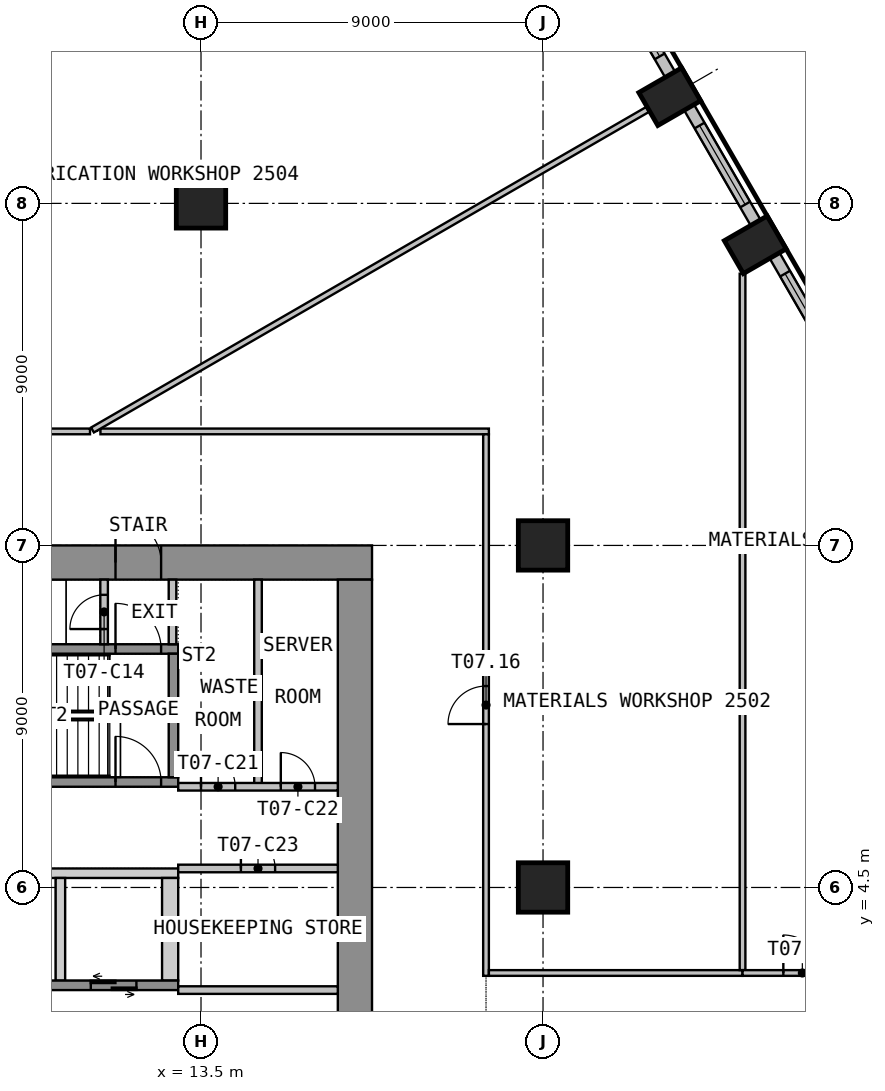
"""IFC4 building model, lengths in metres.
Left out: names, types, materials, properties, quantities, classifications, styles, units other than length and angle.
Written with IfcOpenShell. Run it as: python <this file> out.ifc"""

import sys

from ifc_helpers import new_model, si_unit, direction, frame, frame_2d, origin, origin_2d, place, context, subcontext, project, spatial, polyline, rectangle, circle, outline, extrude, element, fill, save


model = new_model("IFC4")
c1 = context("Model", 3, precision=1e-05, world=origin(), true_north=direction((0.0, 1.0)))
c2 = subcontext(c1, "Body", "Model", "MODEL_VIEW")
j1 = project(units=[si_unit("LENGTHUNIT", "METRE"), si_unit("PLANEANGLEUNIT", "RADIAN")], contexts=[c1])
p1 = place(None, origin())
s1 = spatial("IfcSite", under=j1, at=p1, CompositionType="ELEMENT")
p2 = place(p1, origin())
s2 = spatial("IfcBuilding", under=s1, at=p2, CompositionType="ELEMENT")
p3 = place(p2, frame((0.0, 0.0, 104.7)))
s3 = spatial("IfcBuildingStorey", under=s2, at=p3, CompositionType="ELEMENT", Elevation=104.7)
for number, where, z_axis, x_axis in (
    (1, (28.084, 21.411, 0.0), (0.0, 0.0, 1.0), (-0.5, 0.866, 0.0)),
    (2, (25.834, 25.308, 0.0), (0.0, 0.0, 1.0), (-0.5, 0.866, 0.0)),
):
    element("IfcColumn", number, at=place(p3, frame(where, z_axis=z_axis, x_axis=x_axis)), inside=s3, PredefinedType="COLUMN", context=c2, shape_type="SweptSolid", body=[
        extrude(rectangle(XDim=1.0, YDim=1.3, at=origin_2d()), origin(), (0.0, 0.0, 1.0), 3.525),
    ])
for number, where, z_axis, x_axis in (
    (3, (13.5, 22.5, 0.0), (0.0, 0.0, 1.0), (1.0, 0.0, 0.0)),
    (4, (22.5, 4.5, 0.0), (0.0, 0.0, 1.0), (1.0, 0.0, 0.0)),
    (5, (22.5, 13.5, 0.0), (0.0, 0.0, 1.0), (1.0, 0.0, 0.0)),
):
    element("IfcColumn", number, at=place(p3, frame(where, z_axis=z_axis, x_axis=x_axis)), inside=s3, PredefinedType="COLUMN", context=c2, shape_type="SweptSolid", body=[
        extrude(circle(Radius=0.65, at=origin_2d()), origin(), (0.0, 0.0, 1.0), 3.525),
    ])
p4 = place(p3, frame((30.344, 18.097, 0.0), z_axis=(0.0, 0.0, 1.0), x_axis=(-0.499996256241, 0.866027565234, 0.0)))
e6 = element("IfcWall", 6, at=p4, inside=s3, PredefinedType="SOLIDWALL", context=c2, shape_type="SweptSolid", body=[
    extrude(rectangle(XDim=3.499, YDim=0.3, at=frame_2d((1.75, 0.0))), origin(), (0.0, 0.0, 1.0), 3.525),
])
p5 = place(p4, frame((0.55, 0.0, 0.9)))
e7 = element("IfcOpeningElement", 7, at=p5, cuts=e6, PredefinedType="OPENING", context=c2, shape_type="SweptSolid", body=[
    extrude(rectangle(XDim=2.4, YDim=2.1, at=frame_2d((1.2, 1.05))), frame((0.0, 0.16, 0.0), z_axis=(0.0, -1.0, 0.0), x_axis=(1.0, 0.0, 0.0)), (0.0, 0.0, 1.0), 0.32),
])
p6 = place(p3, frame((28.094, 21.994, 0.0), z_axis=(0.0, 0.0, 1.0), x_axis=(-0.499996256241, 0.866027565234, 0.0)))
e8 = element("IfcWall", 8, at=p6, inside=s3, PredefinedType="SOLIDWALL", context=c2, shape_type="SweptSolid", body=[
    extrude(rectangle(XDim=3.499, YDim=0.3, at=frame_2d((1.75, 0.0))), origin(), (0.0, 0.0, 1.0), 3.525),
])
p7 = place(p6, frame((0.55, 0.0, 0.9)))
e9 = element("IfcOpeningElement", 9, at=p7, cuts=e8, PredefinedType="OPENING", context=c2, shape_type="SweptSolid", body=[
    extrude(rectangle(XDim=2.4, YDim=2.1, at=frame_2d((1.2, 1.05))), frame((0.0, 0.16, 0.0), z_axis=(0.0, -1.0, 0.0), x_axis=(1.0, 0.0, 0.0)), (0.0, 0.0, 1.0), 0.32),
])
p8 = place(p3, frame((25.844, 25.891, 0.0), z_axis=(0.0, 0.0, 1.0), x_axis=(-0.500004907028, 0.866022570692, 0.0)))
e10 = element("IfcWall", 10, at=p8, inside=s3, PredefinedType="SOLIDWALL", context=c2, shape_type="SweptSolid", body=[
    extrude(rectangle(XDim=3.192, YDim=0.3, at=frame_2d((1.596, 0.0))), origin(), (0.0, 0.0, 1.0), 3.525),
])
p9 = place(p8, frame((0.55, 0.0, 0.9)))
e11 = element("IfcOpeningElement", 11, at=p9, cuts=e10, PredefinedType="OPENING", context=c2, shape_type="SweptSolid", body=[
    extrude(rectangle(XDim=2.4, YDim=2.1, at=frame_2d((1.2, 1.05))), frame((0.0, 0.16, 0.0), z_axis=(0.0, -1.0, 0.0), x_axis=(1.0, 0.0, 0.0)), (0.0, 0.0, 1.0), 0.32),
])
p10 = place(p3, frame((-18.0, 13.05, 0.0), z_axis=(0.0, 0.0, 1.0), x_axis=(1.0, 0.0, 0.0)))
e12 = element("IfcWall", 12, at=p10, inside=s3, PredefinedType="SHEAR", context=c2, shape_type="SweptSolid", body=[
    extrude(rectangle(XDim=36.0, YDim=0.9, at=frame_2d((18.0, 0.0))), origin(), (0.0, 0.0, 1.0), 3.525),
])
p11 = place(p10, frame((16.8, 0.0, 0.0)))
e13 = element("IfcOpeningElement", 13, at=p11, cuts=e12, PredefinedType="OPENING", context=c2, shape_type="SweptSolid", body=[
    extrude(rectangle(XDim=2.4, YDim=2.1, at=frame_2d((1.2, 1.05))), frame((0.0, 0.46, 0.0), z_axis=(0.0, -1.0, 0.0), x_axis=(1.0, 0.0, 0.0)), (0.0, 0.0, 1.0), 0.92),
])
p12 = place(p10, frame((5.55, 0.0, 0.0)))
e14 = element("IfcOpeningElement", 14, at=p12, cuts=e12, PredefinedType="OPENING", context=c2, shape_type="SweptSolid", body=[
    extrude(rectangle(XDim=1.2, YDim=2.1, at=frame_2d((0.6, 1.05))), frame((0.0, 0.46, 0.0), z_axis=(0.0, -1.0, 0.0), x_axis=(1.0, 0.0, 0.0)), (0.0, 0.0, 1.0), 0.92),
])
p13 = place(p10, frame((29.25, 0.0, 0.0)))
e15 = element("IfcOpeningElement", 15, at=p13, cuts=e12, PredefinedType="OPENING", context=c2, shape_type="SweptSolid", body=[
    extrude(rectangle(XDim=1.2, YDim=2.1, at=frame_2d((0.6, 1.05))), frame((0.0, 0.46, 0.0), z_axis=(0.0, -1.0, 0.0), x_axis=(1.0, 0.0, 0.0)), (0.0, 0.0, 1.0), 0.92),
])
p14 = place(p3, frame((17.55, -12.6, 0.0), z_axis=(0.0, 0.0, 1.0), x_axis=(0.0, 1.0, 0.0)))
e16 = element("IfcWall", 16, at=p14, inside=s3, PredefinedType="SHEAR", context=c2, shape_type="SweptSolid", body=[
    extrude(rectangle(XDim=25.2, YDim=0.9, at=frame_2d((12.6, 0.0))), origin(), (0.0, 0.0, 1.0), 3.525),
])
p15 = place(p14, frame((11.4, 0.0, 0.0)))
e17 = element("IfcOpeningElement", 17, at=p15, cuts=e16, PredefinedType="OPENING", context=c2, shape_type="SweptSolid", body=[
    extrude(rectangle(XDim=2.4, YDim=2.1, at=frame_2d((1.2, 1.05))), frame((0.0, 0.46, 0.0), z_axis=(0.0, -1.0, 0.0), x_axis=(1.0, 0.0, 0.0)), (0.0, 0.0, 1.0), 0.92),
])
p16 = place(p3, origin())
e18 = element("IfcWall", 18, at=p16, inside=s3, PredefinedType="SHEAR", context=c2, shape_type="SweptSolid", body=[
    extrude(outline(polyline([(-12.9, 4.75), (12.9, 4.75), (12.9, 5.0), (-12.9, 5.0), (-12.9, 4.75)])), origin(), (0.0, 0.0, 1.0), 3.525),
])
p17 = place(p3, origin())
e19 = element("IfcWall", 19, at=p17, inside=s3, PredefinedType="SHEAR", context=c2, shape_type="SweptSolid", body=[
    extrude(outline(polyline([(9.675, 2.05), (9.925, 2.05), (9.925, 4.75), (9.675, 4.75), (9.675, 2.05)])), origin(), (0.0, 0.0, 1.0), 3.525),
])
p18 = place(p3, origin())
e20 = element("IfcWall", 20, at=p18, inside=s3, PredefinedType="SHEAR", context=c2, shape_type="SweptSolid", body=[
    extrude(outline(polyline([(12.475, 2.05), (12.9, 2.05), (12.9, 4.75), (12.475, 4.75), (12.475, 2.05)])), origin(), (0.0, 0.0, 1.0), 3.525),
])
p19 = place(p3, frame((-12.9, 1.925, 0.0), z_axis=(0.0, 0.0, 1.0), x_axis=(1.0, 0.0, 0.0)))
e21 = element("IfcWall", 21, at=p19, inside=s3, PredefinedType="SHEAR", context=c2, shape_type="SweptSolid", body=[
    extrude(rectangle(XDim=25.8, YDim=0.25, at=frame_2d((12.9, 0.0))), origin(), (0.0, 0.0, 1.0), 3.525),
])
p20 = place(p19, frame((9.5, 0.0, 0.0)))
e22 = element("IfcOpeningElement", 22, at=p20, cuts=e21, PredefinedType="OPENING", context=c2, shape_type="SweptSolid", body=[
    extrude(rectangle(XDim=1.2, YDim=2.1, at=frame_2d((0.6, 1.05))), frame((0.0, 0.135, 0.0), z_axis=(0.0, -1.0, 0.0), x_axis=(1.0, 0.0, 0.0)), (0.0, 0.0, 1.0), 0.27),
])
p21 = place(p19, frame((12.3, 0.0, 0.0)))
e23 = element("IfcOpeningElement", 23, at=p21, cuts=e21, PredefinedType="OPENING", context=c2, shape_type="SweptSolid", body=[
    extrude(rectangle(XDim=1.2, YDim=2.1, at=frame_2d((0.6, 1.05))), frame((0.0, 0.135, 0.0), z_axis=(0.0, -1.0, 0.0), x_axis=(1.0, 0.0, 0.0)), (0.0, 0.0, 1.0), 0.27),
])
p22 = place(p19, frame((15.1, 0.0, 0.0)))
e24 = element("IfcOpeningElement", 24, at=p22, cuts=e21, PredefinedType="OPENING", context=c2, shape_type="SweptSolid", body=[
    extrude(rectangle(XDim=1.2, YDim=2.1, at=frame_2d((0.6, 1.05))), frame((0.0, 0.135, 0.0), z_axis=(0.0, -1.0, 0.0), x_axis=(1.0, 0.0, 0.0)), (0.0, 0.0, 1.0), 0.27),
])
p23 = place(p19, frame((17.9, 0.0, 0.0)))
e25 = element("IfcOpeningElement", 25, at=p23, cuts=e21, PredefinedType="OPENING", context=c2, shape_type="SweptSolid", body=[
    extrude(rectangle(XDim=1.2, YDim=2.1, at=frame_2d((0.6, 1.05))), frame((0.0, 0.135, 0.0), z_axis=(0.0, -1.0, 0.0), x_axis=(1.0, 0.0, 0.0)), (0.0, 0.0, 1.0), 0.27),
])
p24 = place(p19, frame((20.7, 0.0, 0.0)))
e26 = element("IfcOpeningElement", 26, at=p24, cuts=e21, PredefinedType="OPENING", context=c2, shape_type="SweptSolid", body=[
    extrude(rectangle(XDim=1.2, YDim=2.1, at=frame_2d((0.6, 1.05))), frame((0.0, 0.135, 0.0), z_axis=(0.0, -1.0, 0.0), x_axis=(1.0, 0.0, 0.0)), (0.0, 0.0, 1.0), 0.27),
])
p25 = place(p19, frame((23.5, 0.0, 0.0)))
e27 = element("IfcOpeningElement", 27, at=p25, cuts=e21, PredefinedType="OPENING", context=c2, shape_type="SweptSolid", body=[
    extrude(rectangle(XDim=1.2, YDim=2.1, at=frame_2d((0.6, 1.05))), frame((0.0, 0.135, 0.0), z_axis=(0.0, -1.0, 0.0), x_axis=(1.0, 0.0, 0.0)), (0.0, 0.0, 1.0), 0.27),
])
p26 = place(p3, frame((2.8, 7.275, 0.0), z_axis=(0.0, 0.0, 1.0), x_axis=(1.0, 0.0, 0.0)))
e28 = element("IfcWall", 28, at=p26, inside=s3, PredefinedType="SHEAR", context=c2, shape_type="SweptSolid", body=[
    extrude(rectangle(XDim=10.1, YDim=0.25, at=frame_2d((5.05, 0.0))), origin(), (0.0, 0.0, 1.0), 3.525),
])
p27 = place(p26, frame((8.45, 0.0, 0.0)))
e29 = element("IfcOpeningElement", 29, at=p27, cuts=e28, PredefinedType="OPENING", context=c2, shape_type="SweptSolid", body=[
    extrude(rectangle(XDim=1.2, YDim=2.1, at=frame_2d((0.6, 1.05))), frame((0.0, 0.135, 0.0), z_axis=(0.0, -1.0, 0.0), x_axis=(1.0, 0.0, 0.0)), (0.0, 0.0, 1.0), 0.27),
])
p28 = place(p3, frame((2.8, 10.775, 0.0), z_axis=(0.0, 0.0, 1.0), x_axis=(1.0, 0.0, 0.0)))
e30 = element("IfcWall", 30, at=p28, inside=s3, PredefinedType="SHEAR", context=c2, shape_type="SweptSolid", body=[
    extrude(rectangle(XDim=10.1, YDim=0.25, at=frame_2d((5.05, 0.0))), origin(), (0.0, 0.0, 1.0), 3.525),
])
p29 = place(p28, frame((8.45, 0.0, 0.0)))
e31 = element("IfcOpeningElement", 31, at=p29, cuts=e30, PredefinedType="OPENING", context=c2, shape_type="SweptSolid", body=[
    extrude(rectangle(XDim=1.2, YDim=2.1, at=frame_2d((0.6, 1.05))), frame((0.0, 0.135, 0.0), z_axis=(0.0, -1.0, 0.0), x_axis=(1.0, 0.0, 0.0)), (0.0, 0.0, 1.0), 0.27),
])
p30 = place(p3, frame((12.775, 7.4, 0.0), z_axis=(0.0, 0.0, 1.0), x_axis=(0.0, 1.0, 0.0)))
e32 = element("IfcWall", 32, at=p30, inside=s3, PredefinedType="SHEAR", context=c2, shape_type="SweptSolid", body=[
    extrude(rectangle(XDim=3.25, YDim=0.25, at=frame_2d((1.625, 0.0))), origin(), (0.0, 0.0, 1.0), 3.525),
])
p31 = place(p3, frame((12.75, 10.9, 0.0), z_axis=(0.0, 0.0, 1.0), x_axis=(0.0, 1.0, 0.0)))
e33 = element("IfcWall", 33, at=p31, inside=s3, PredefinedType="PARTITIONING", context=c2, shape_type="SweptSolid", body=[
    extrude(rectangle(XDim=1.7, YDim=0.2, at=frame_2d((0.85, 0.0))), origin(), (0.0, 0.0, 1.0), 3.525),
])
p32 = place(p3, frame((10.95, 10.9, 0.0), z_axis=(0.0, 0.0, 1.0), x_axis=(0.0, 1.0, 0.0)))
e34 = element("IfcWall", 34, at=p32, inside=s3, PredefinedType="PARTITIONING", context=c2, shape_type="SweptSolid", body=[
    extrude(rectangle(XDim=1.7, YDim=0.2, at=frame_2d((0.85, 0.0))), origin(), (0.0, 0.0, 1.0), 3.525),
])
p33 = place(p32, frame((0.4, 0.0, 0.0)))
e35 = element("IfcOpeningElement", 35, at=p33, cuts=e34, PredefinedType="OPENING", context=c2, shape_type="SweptSolid", body=[
    extrude(rectangle(XDim=0.9, YDim=2.1, at=frame_2d((0.45, 1.05))), frame((0.0, 0.11, 0.0), z_axis=(0.0, -1.0, 0.0), x_axis=(1.0, 0.0, 0.0)), (0.0, 0.0, 1.0), 0.22),
])
p34 = place(p3, frame((15.0, 7.15, 0.0), z_axis=(0.0, 0.0, 1.0), x_axis=(0.0, 1.0, 0.0)))
e36 = element("IfcWall", 36, at=p34, inside=s3, PredefinedType="PARTITIONING", context=c2, shape_type="SweptSolid", body=[
    extrude(rectangle(XDim=5.45, YDim=0.2, at=frame_2d((2.725, 0.0))), origin(), (0.0, 0.0, 1.0), 3.525),
])
p35 = place(p3, frame((12.9, 7.15, 0.0), z_axis=(0.0, 0.0, 1.0), x_axis=(1.0, 0.0, 0.0)))
e37 = element("IfcWall", 37, at=p35, inside=s3, PredefinedType="PARTITIONING", context=c2, shape_type="SweptSolid", body=[
    extrude(rectangle(XDim=4.2, YDim=0.2, at=frame_2d((2.1, 0.0))), origin(), (0.0, 0.0, 1.0), 3.525),
])
p36 = place(p35, frame((0.6, 0.0, 0.0)))
e38 = element("IfcOpeningElement", 38, at=p36, cuts=e37, PredefinedType="OPENING", context=c2, shape_type="SweptSolid", body=[
    extrude(rectangle(XDim=0.9, YDim=2.1, at=frame_2d((0.45, 1.05))), frame((0.0, 0.11, 0.0), z_axis=(0.0, -1.0, 0.0), x_axis=(1.0, 0.0, 0.0)), (0.0, 0.0, 1.0), 0.22),
])
p37 = place(p35, frame((2.7, 0.0, 0.0)))
e39 = element("IfcOpeningElement", 39, at=p37, cuts=e37, PredefinedType="OPENING", context=c2, shape_type="SweptSolid", body=[
    extrude(rectangle(XDim=0.9, YDim=2.1, at=frame_2d((0.45, 1.05))), frame((0.0, 0.11, 0.0), z_axis=(0.0, -1.0, 0.0), x_axis=(1.0, 0.0, 0.0)), (0.0, 0.0, 1.0), 0.22),
])
p38 = place(p3, frame((12.9, 5.0, 0.0), z_axis=(0.0, 0.0, 1.0), x_axis=(1.0, 0.0, 0.0)))
e40 = element("IfcWall", 40, at=p38, inside=s3, PredefinedType="PARTITIONING", context=c2, shape_type="SweptSolid", body=[
    extrude(rectangle(XDim=4.2, YDim=0.2, at=frame_2d((2.1, 0.0))), origin(), (0.0, 0.0, 1.0), 3.525),
])
p39 = place(p38, frame((1.65, 0.0, 0.0)))
e41 = element("IfcOpeningElement", 41, at=p39, cuts=e40, PredefinedType="OPENING", context=c2, shape_type="SweptSolid", body=[
    extrude(rectangle(XDim=0.9, YDim=2.1, at=frame_2d((0.45, 1.05))), frame((0.0, 0.11, 0.0), z_axis=(0.0, -1.0, 0.0), x_axis=(1.0, 0.0, 0.0)), (0.0, 0.0, 1.0), 0.22),
])
p40 = place(p3, frame((12.9, 1.8, 0.0), z_axis=(0.0, 0.0, 1.0), x_axis=(1.0, 0.0, 0.0)))
e42 = element("IfcWall", 42, at=p40, inside=s3, PredefinedType="PARTITIONING", context=c2, shape_type="SweptSolid", body=[
    extrude(rectangle(XDim=4.2, YDim=0.2, at=frame_2d((2.1, 0.0))), origin(), (0.0, 0.0, 1.0), 3.525),
])
p41 = place(p3, frame((10.579, 16.5, 0.0), z_axis=(0.0, 0.0, 1.0), x_axis=(-1.0, 0.0, 0.0)))
e43 = element("IfcWall", 43, at=p41, inside=s3, PredefinedType="PARTITIONING", context=c2, shape_type="SweptSolid", body=[
    extrude(rectangle(XDim=3.829, YDim=0.15, at=frame_2d((1.915, 0.0))), origin(), (0.0, 0.0, 1.0), 3.525),
])
p42 = place(p3, frame((21.075, 16.5, 0.0), z_axis=(0.0, 0.0, 1.0), x_axis=(-1.0, 0.0, 0.0)))
e44 = element("IfcWall", 44, at=p42, inside=s3, PredefinedType="PARTITIONING", context=c2, shape_type="SweptSolid", body=[
    extrude(rectangle(XDim=10.221, YDim=0.15, at=frame_2d((5.11, 0.0))), origin(), (0.0, 0.0, 1.0), 3.525),
])
p43 = place(p3, frame((25.254, 24.973, 0.0), z_axis=(0.0, 0.0, 1.0), x_axis=(-0.866017851419, -0.500013080853, 0.0)))
e45 = element("IfcWall", 45, at=p43, inside=s3, PredefinedType="PARTITIONING", context=c2, shape_type="SweptSolid", body=[
    extrude(rectangle(XDim=16.87, YDim=0.15, at=frame_2d((8.435, 0.0))), origin(), (0.0, 0.0, 1.0), 3.525),
])
p44 = place(p3, frame((21.0, 2.175, 0.0), z_axis=(0.0, 0.0, 1.0), x_axis=(0.0, 1.0, 0.0)))
e46 = element("IfcWall", 46, at=p44, inside=s3, PredefinedType="PARTITIONING", context=c2, shape_type="SweptSolid", body=[
    extrude(rectangle(XDim=14.25, YDim=0.15, at=frame_2d((7.125, 0.0))), origin(), (0.0, 0.0, 1.0), 3.525),
])
p45 = place(p44, frame((6.625, 0.0, 0.0)))
e47 = element("IfcOpeningElement", 47, at=p45, cuts=e46, PredefinedType="OPENING", context=c2, shape_type="SweptSolid", body=[
    extrude(rectangle(XDim=1.0, YDim=2.1, at=frame_2d((0.5, 1.05))), frame((0.0, 0.085, 0.0), z_axis=(0.0, -1.0, 0.0), x_axis=(1.0, 0.0, 0.0)), (0.0, 0.0, 1.0), 0.17),
])
p46 = place(p3, frame((21.075, 2.25, 0.0), z_axis=(0.0, 0.0, 1.0), x_axis=(1.0, 0.0, 0.0)))
e48 = element("IfcWall", 48, at=p46, inside=s3, PredefinedType="PARTITIONING", context=c2, shape_type="SweptSolid", body=[
    extrude(rectangle(XDim=6.675, YDim=0.15, at=frame_2d((3.337, 0.0))), origin(), (0.0, 0.0, 1.0), 3.525),
])
p47 = place(p3, frame((27.75, 20.649, 0.0), z_axis=(0.0, 0.0, 1.0), x_axis=(0.0, -1.0, 0.0)))
e49 = element("IfcWall", 49, at=p47, inside=s3, PredefinedType="PARTITIONING", context=c2, shape_type="SweptSolid", body=[
    extrude(rectangle(XDim=18.324, YDim=0.15, at=frame_2d((9.162, 0.0))), origin(), (0.0, 0.0, 1.0), 3.525),
])
p48 = place(p3, frame((27.75, 2.25, 0.0), z_axis=(0.0, 0.0, 1.0), x_axis=(1.0, 0.0, 0.0)))
e50 = element("IfcWall", 50, at=p48, inside=s3, PredefinedType="PARTITIONING", context=c2, shape_type="SweptSolid", body=[
    extrude(rectangle(XDim=3.147, YDim=0.15, at=frame_2d((1.573, 0.0))), origin(), (0.0, 0.0, 1.0), 3.525),
])
p49 = place(p48, frame((1.073, 0.0, 0.0)))
e51 = element("IfcOpeningElement", 51, at=p49, cuts=e50, PredefinedType="OPENING", context=c2, shape_type="SweptSolid", body=[
    extrude(rectangle(XDim=1.0, YDim=2.1, at=frame_2d((0.5, 1.05))), frame((0.0, 0.085, 0.0), z_axis=(0.0, -1.0, 0.0), x_axis=(1.0, 0.0, 0.0)), (0.0, 0.0, 1.0), 0.17),
])
p50 = place(p5, origin())
e52 = element("IfcWindow", 52, at=p50, inside=s3, PartitioningType="SINGLE_PANEL", PredefinedType="WINDOW", context=c2, shape_type="SweptSolid", body=[
    extrude(rectangle(XDim=2.4, YDim=2.1, at=frame_2d((1.2, 1.05))), frame((0.0, 0.03, 0.0), z_axis=(0.0, -1.0, 0.0), x_axis=(1.0, 0.0, 0.0)), (0.0, 0.0, 1.0), 0.06),
])
fill(e7, e52)
p51 = place(p7, origin())
e53 = element("IfcWindow", 53, at=p51, inside=s3, PartitioningType="SINGLE_PANEL", PredefinedType="WINDOW", context=c2, shape_type="SweptSolid", body=[
    extrude(rectangle(XDim=2.4, YDim=2.1, at=frame_2d((1.2, 1.05))), frame((0.0, 0.03, 0.0), z_axis=(0.0, -1.0, 0.0), x_axis=(1.0, 0.0, 0.0)), (0.0, 0.0, 1.0), 0.06),
])
fill(e9, e53)
p52 = place(p9, origin())
e54 = element("IfcWindow", 54, at=p52, inside=s3, PartitioningType="SINGLE_PANEL", PredefinedType="WINDOW", context=c2, shape_type="SweptSolid", body=[
    extrude(rectangle(XDim=2.4, YDim=2.1, at=frame_2d((1.2, 1.05))), frame((0.0, 0.03, 0.0), z_axis=(0.0, -1.0, 0.0), x_axis=(1.0, 0.0, 0.0)), (0.0, 0.0, 1.0), 0.06),
])
fill(e11, e54)
p53 = place(p13, origin())
e55 = element("IfcDoor", 55, at=p53, inside=s3, OperationType="SINGLE_SWING_RIGHT", PredefinedType="DOOR", context=c2, shape_type="SweptSolid", body=[
    extrude(rectangle(XDim=1.2, YDim=2.1, at=frame_2d((0.6, 1.05))), frame((0.0, 0.025, 0.0), z_axis=(0.0, -1.0, 0.0), x_axis=(1.0, 0.0, 0.0)), (0.0, 0.0, 1.0), 0.05),
])
fill(e15, e55)
p54 = place(p25, origin())
e56 = element("IfcDoor", 56, at=p54, inside=s3, OperationType="DOUBLE_DOOR_SLIDING", PredefinedType="DOOR", context=c2, shape_type="SweptSolid", body=[
    extrude(rectangle(XDim=1.2, YDim=2.1, at=frame_2d((0.6, 1.05))), frame((0.0, 0.025, 0.0), z_axis=(0.0, -1.0, 0.0), x_axis=(1.0, 0.0, 0.0)), (0.0, 0.0, 1.0), 0.05),
])
fill(e27, e56)
p55 = place(p27, origin())
e57 = element("IfcDoor", 57, at=p55, inside=s3, OperationType="SINGLE_SWING_LEFT", PredefinedType="DOOR", context=c2, shape_type="SweptSolid", body=[
    extrude(rectangle(XDim=1.2, YDim=2.1, at=frame_2d((0.6, 1.05))), frame((0.0, 0.025, 0.0), z_axis=(0.0, -1.0, 0.0), x_axis=(1.0, 0.0, 0.0)), (0.0, 0.0, 1.0), 0.05),
])
fill(e29, e57)
p56 = place(p29, origin())
e58 = element("IfcDoor", 58, at=p56, inside=s3, OperationType="SINGLE_SWING_RIGHT", PredefinedType="DOOR", context=c2, shape_type="SweptSolid", body=[
    extrude(rectangle(XDim=1.2, YDim=2.1, at=frame_2d((0.6, 1.05))), frame((0.0, 0.025, 0.0), z_axis=(0.0, -1.0, 0.0), x_axis=(1.0, 0.0, 0.0)), (0.0, 0.0, 1.0), 0.05),
])
fill(e31, e58)
p57 = place(p33, origin())
e59 = element("IfcDoor", 59, at=p57, inside=s3, OperationType="SINGLE_SWING_LEFT", PredefinedType="DOOR", context=c2, shape_type="SweptSolid", body=[
    extrude(rectangle(XDim=0.9, YDim=2.1, at=frame_2d((0.45, 1.05))), frame((0.0, 0.025, 0.0), z_axis=(0.0, -1.0, 0.0), x_axis=(1.0, 0.0, 0.0)), (0.0, 0.0, 1.0), 0.05),
])
fill(e35, e59)
p58 = place(p36, origin())
e60 = element("IfcDoor", 60, at=p58, inside=s3, OperationType="SINGLE_SWING_LEFT", PredefinedType="DOOR", context=c2, shape_type="SweptSolid", body=[
    extrude(rectangle(XDim=0.9, YDim=2.1, at=frame_2d((0.45, 1.05))), frame((0.0, 0.025, 0.0), z_axis=(0.0, -1.0, 0.0), x_axis=(1.0, 0.0, 0.0)), (0.0, 0.0, 1.0), 0.05),
])
fill(e38, e60)
p59 = place(p37, origin())
e61 = element("IfcDoor", 61, at=p59, inside=s3, OperationType="SINGLE_SWING_LEFT", PredefinedType="DOOR", context=c2, shape_type="SweptSolid", body=[
    extrude(rectangle(XDim=0.9, YDim=2.1, at=frame_2d((0.45, 1.05))), frame((0.0, 0.025, 0.0), z_axis=(0.0, -1.0, 0.0), x_axis=(1.0, 0.0, 0.0)), (0.0, 0.0, 1.0), 0.05),
])
fill(e39, e61)
p60 = place(p39, origin())
e62 = element("IfcDoor", 62, at=p60, inside=s3, OperationType="SINGLE_SWING_LEFT", PredefinedType="DOOR", context=c2, shape_type="SweptSolid", body=[
    extrude(rectangle(XDim=0.9, YDim=2.1, at=frame_2d((0.45, 1.05))), frame((0.0, 0.025, 0.0), z_axis=(0.0, -1.0, 0.0), x_axis=(1.0, 0.0, 0.0)), (0.0, 0.0, 1.0), 0.05),
])
fill(e41, e62)
p61 = place(p45, origin())
e63 = element("IfcDoor", 63, at=p61, inside=s3, OperationType="SINGLE_SWING_RIGHT", PredefinedType="DOOR", context=c2, shape_type="SweptSolid", body=[
    extrude(rectangle(XDim=1.0, YDim=2.1, at=frame_2d((0.5, 1.05))), frame((0.0, 0.025, 0.0), z_axis=(0.0, -1.0, 0.0), x_axis=(1.0, 0.0, 0.0)), (0.0, 0.0, 1.0), 0.05),
])
fill(e47, e63)
p62 = place(p49, origin())
e64 = element("IfcDoor", 64, at=p62, inside=s3, OperationType="SINGLE_SWING_LEFT", PredefinedType="DOOR", context=c2, shape_type="SweptSolid", body=[
    extrude(rectangle(XDim=1.0, YDim=2.1, at=frame_2d((0.5, 1.05))), frame((0.0, 0.025, 0.0), z_axis=(0.0, -1.0, 0.0), x_axis=(1.0, 0.0, 0.0)), (0.0, 0.0, 1.0), 0.05),
])
fill(e51, e64)
save(model, sys.argv[1])
